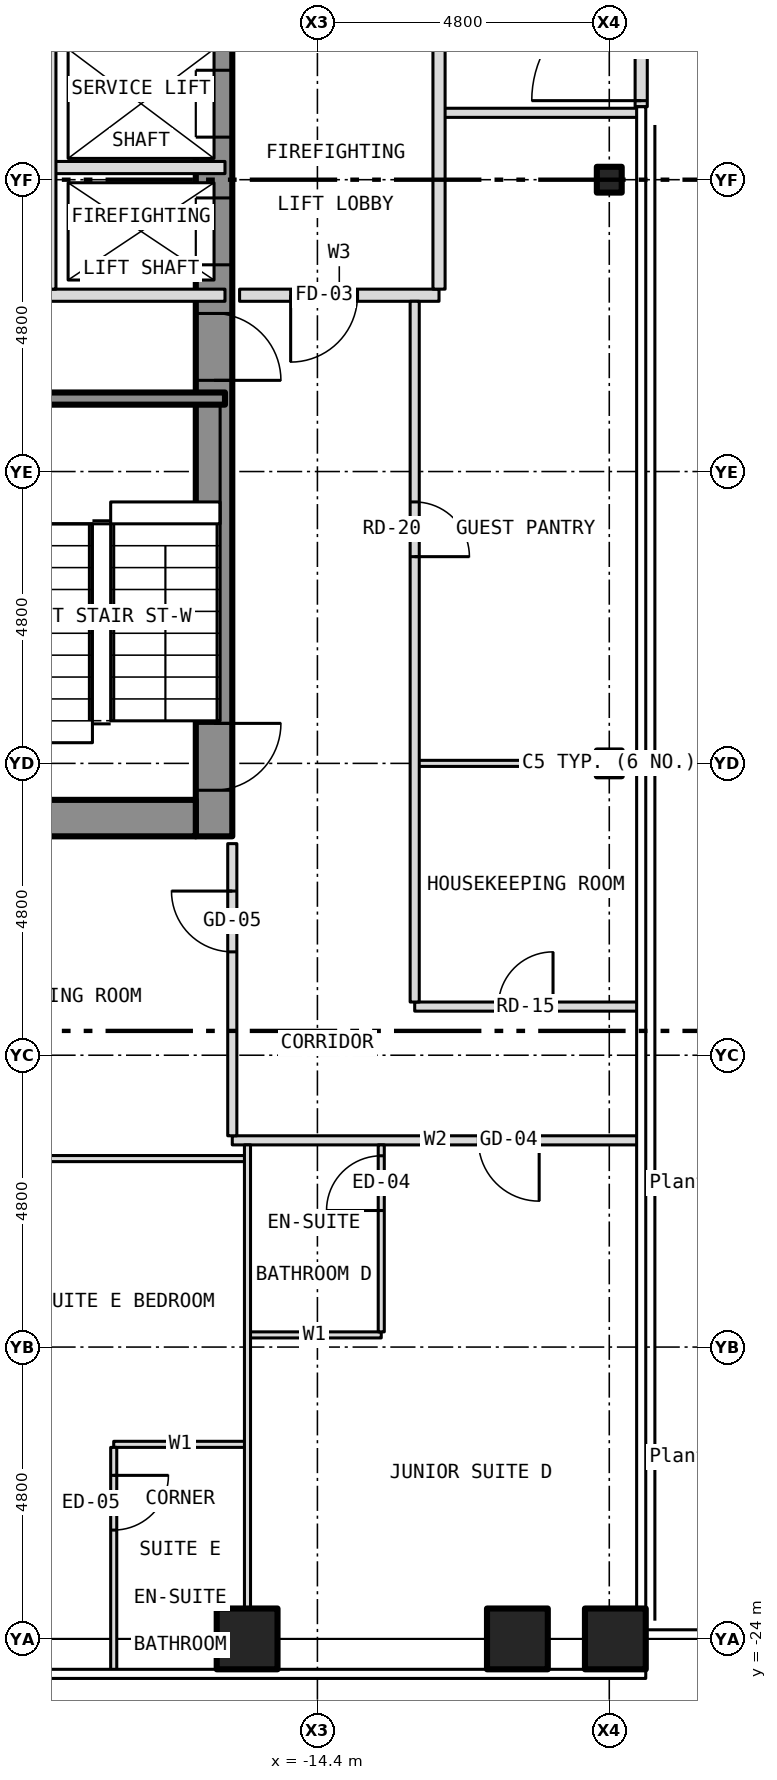
"""IFC4 building model, lengths in metres.
Left out: names, types, materials, properties, quantities, classifications, styles, units other than length and angle.
Written with IfcOpenShell. Run it as: python <this file> out.ifc"""

import sys

from ifc_helpers import new_model, si_unit, direction, frame, frame_2d, origin, origin_2d, place, context, subcontext, project, spatial, rectangle, hollow_rectangle, i_section, extrude, element, fill, save


model = new_model("IFC4")
c1 = context("Model", 3, precision=1e-05, world=origin(), true_north=direction((0.0, 1.0)))
c2 = subcontext(c1, "Body", "Model", "MODEL_VIEW")
j1 = project(units=[si_unit("LENGTHUNIT", "METRE"), si_unit("PLANEANGLEUNIT", "RADIAN")], contexts=[c1])
p1 = place(None, origin())
s1 = spatial("IfcSite", under=j1, at=p1, CompositionType="ELEMENT")
p2 = place(p1, origin())
s2 = spatial("IfcBuilding", under=s1, at=p2, CompositionType="ELEMENT")
p3 = place(p2, frame((0.0, 0.0, 60.0)))
s3 = spatial("IfcBuildingStorey", under=s2, at=p3, CompositionType="ELEMENT", Elevation=60.0)
for number, where, z_axis, x_axis in (
    (1, (-15.556, -24.0, -0.15), (0.0, 0.0, 1.0), (1.0, 0.0, 0.0)),
    (2, (-11.111, -24.0, -0.15), (0.0, 0.0, 1.0), (1.0, 0.0, 0.0)),
    (3, (-9.5, -24.0, -0.15), (0.0, 0.0, 1.0), (1.0, 0.0, 0.0)),
):
    element("IfcColumn", number, at=place(p3, frame(where, z_axis=z_axis, x_axis=x_axis)), inside=s3, PredefinedType="COLUMN", context=c2, shape_type="SweptSolid", body=[
        extrude(hollow_rectangle(XDim=1.0, YDim=1.0, WallThickness=0.06, at=origin_2d()), origin(), (0.0, 0.0, 1.0), 3.5),
    ])
for number, where, z_axis, x_axis in (
    (4, (-9.6, -9.6, -0.15), (0.0, 0.0, 1.0), (1.0, 0.0, 0.0)),
    (5, (-9.6, 0.0, -0.15), (0.0, 0.0, 1.0), (1.0, 0.0, 0.0)),
):
    element("IfcColumn", number, at=place(p3, frame(where, z_axis=z_axis, x_axis=x_axis)), inside=s3, PredefinedType="COLUMN", context=c2, shape_type="SweptSolid", body=[
        extrude(i_section(OverallWidth=0.409, OverallDepth=0.424, WebThickness=0.033, FlangeThickness=0.052, at=origin_2d()), origin(), (0.0, 0.0, 1.0), 3.5),
    ])
p4 = place(p3, frame((-16.1, -10.8, 0.0), z_axis=(0.0, 0.0, 1.0), x_axis=(0.0, 1.0, 0.0)))
e6 = element("IfcWall", 6, at=p4, inside=s3, PredefinedType="SHEAR", context=c2, shape_type="SweptSolid", body=[
    extrude(rectangle(XDim=21.6, YDim=0.6, at=frame_2d((10.8, 0.0))), origin(), (0.0, 0.0, 1.0), 3.25),
])
p5 = place(p4, frame((9.4, 0.0, 0.0)))
e7 = element("IfcOpeningElement", 7, at=p5, cuts=e6, PredefinedType="OPENING", context=c2, shape_type="SweptSolid", body=[
    extrude(rectangle(XDim=1.1, YDim=2.1, at=frame_2d((0.55, 1.05))), frame((0.0, 0.312, 0.0), z_axis=(0.0, -1.0, 0.0), x_axis=(1.0, 0.0, 0.0)), (0.0, 0.0, 1.0), 0.624),
])
p6 = place(p4, frame((11.5, 0.0, 0.0)))
e8 = element("IfcOpeningElement", 8, at=p6, cuts=e6, PredefinedType="OPENING", context=c2, shape_type="SweptSolid", body=[
    extrude(rectangle(XDim=1.1, YDim=2.1, at=frame_2d((0.55, 1.05))), frame((0.0, 0.312, 0.0), z_axis=(0.0, -1.0, 0.0), x_axis=(1.0, 0.0, 0.0)), (0.0, 0.0, 1.0), 0.624),
])
p7 = place(p4, frame((13.6, 0.0, 0.0)))
e9 = element("IfcOpeningElement", 9, at=p7, cuts=e6, PredefinedType="OPENING", context=c2, shape_type="SweptSolid", body=[
    extrude(rectangle(XDim=1.1, YDim=2.1, at=frame_2d((0.55, 1.05))), frame((0.0, 0.312, 0.0), z_axis=(0.0, -1.0, 0.0), x_axis=(1.0, 0.0, 0.0)), (0.0, 0.0, 1.0), 0.624),
])
p8 = place(p4, frame((15.7, 0.0, 0.0)))
e10 = element("IfcOpeningElement", 10, at=p8, cuts=e6, PredefinedType="OPENING", context=c2, shape_type="SweptSolid", body=[
    extrude(rectangle(XDim=1.1, YDim=2.1, at=frame_2d((0.55, 1.05))), frame((0.0, 0.312, 0.0), z_axis=(0.0, -1.0, 0.0), x_axis=(1.0, 0.0, 0.0)), (0.0, 0.0, 1.0), 0.624),
])
p9 = place(p4, frame((17.8, 0.0, 0.0)))
e11 = element("IfcOpeningElement", 11, at=p9, cuts=e6, PredefinedType="OPENING", context=c2, shape_type="SweptSolid", body=[
    extrude(rectangle(XDim=1.1, YDim=2.1, at=frame_2d((0.55, 1.05))), frame((0.0, 0.312, 0.0), z_axis=(0.0, -1.0, 0.0), x_axis=(1.0, 0.0, 0.0)), (0.0, 0.0, 1.0), 0.624),
])
p10 = place(p4, frame((0.758, 0.0, 0.0)))
e12 = element("IfcOpeningElement", 12, at=p10, cuts=e6, PredefinedType="OPENING", context=c2, shape_type="SweptSolid", body=[
    extrude(rectangle(XDim=1.1, YDim=2.1, at=frame_2d((0.55, 1.05))), frame((0.0, 0.312, 0.0), z_axis=(0.0, -1.0, 0.0), x_axis=(1.0, 0.0, 0.0)), (0.0, 0.0, 1.0), 0.624),
])
p11 = place(p4, frame((7.5, 0.0, 0.0)))
e13 = element("IfcOpeningElement", 13, at=p11, cuts=e6, PredefinedType="OPENING", context=c2, shape_type="SweptSolid", body=[
    extrude(rectangle(XDim=1.1, YDim=2.1, at=frame_2d((0.55, 1.05))), frame((0.0, 0.312, 0.0), z_axis=(0.0, -1.0, 0.0), x_axis=(1.0, 0.0, 0.0)), (0.0, 0.0, 1.0), 0.624),
])
p12 = place(p3, frame((-23.4, -10.5, 0.0), z_axis=(0.0, 0.0, 1.0), x_axis=(1.0, 0.0, 0.0)))
e14 = element("IfcWall", 14, at=p12, inside=s3, PredefinedType="SHEAR", context=c2, shape_type="SweptSolid", body=[
    extrude(rectangle(XDim=7.0, YDim=0.6, at=frame_2d((3.5, 0.0))), origin(), (0.0, 0.0, 1.0), 3.25),
])
p13 = place(p3, frame((-9.075, 1.2, 0.0), z_axis=(0.0, 0.0, 1.0), x_axis=(0.0, 1.0, 0.0)))
e15 = element("IfcWall", 15, at=p13, inside=s3, PredefinedType="SOLIDWALL", context=c2, shape_type="SweptSolid", body=[
    extrude(rectangle(XDim=2.0, YDim=0.2, at=frame_2d((1.0, 0.0))), origin(), (0.0, 0.0, 1.0), 2.593),
])
p14 = place(p13, frame((0.1, 0.0, 0.0)))
e16 = element("IfcOpeningElement", 16, at=p14, cuts=e15, PredefinedType="OPENING", context=c2, shape_type="SweptSolid", body=[
    extrude(rectangle(XDim=1.8, YDim=2.1, at=frame_2d((0.9, 1.05))), frame((0.0, 0.112, 0.0), z_axis=(0.0, -1.0, 0.0), x_axis=(1.0, 0.0, 0.0)), (0.0, 0.0, 1.0), 0.224),
])
for number, where, z_axis, x_axis in (
    (17, (-17.75, -20.8, 0.0), (0.0, 0.0, 1.0), (1.0, 0.0, 0.0)),
    (18, (-15.55, -19.0, 0.0), (0.0, 0.0, 1.0), (1.0, 0.0, 0.0)),
):
    element("IfcWall", number, at=place(p3, frame(where, z_axis=z_axis, x_axis=x_axis)), inside=s3, PredefinedType="PARTITIONING", context=c2, shape_type="SweptSolid", body=[
        extrude(rectangle(XDim=2.2, YDim=0.1, at=frame_2d((1.1, 0.0))), origin(), (0.0, 0.0, 1.0), 3.35),
    ])
p15 = place(p3, frame((-23.88, -16.1, 0.0), z_axis=(0.0, 0.0, 1.0), x_axis=(1.0, 0.0, 0.0)))
e19 = element("IfcWall", 19, at=p15, inside=s3, PredefinedType="PARTITIONING", context=c2, shape_type="SweptSolid", body=[
    extrude(rectangle(XDim=8.33, YDim=0.1, at=frame_2d((4.165, 0.0))), origin(), (0.0, 0.0, 1.0), 3.35),
])
p16 = place(p15, frame((3.652, 0.0, 0.0)))
e20 = element("IfcOpeningElement", 20, at=p16, cuts=e19, PredefinedType="OPENING", context=c2, shape_type="SweptSolid", body=[
    extrude(rectangle(XDim=0.9, YDim=2.1, at=frame_2d((0.45, 1.05))), frame((0.0, 0.062, 0.0), z_axis=(0.0, -1.0, 0.0), x_axis=(1.0, 0.0, 0.0)), (0.0, 0.0, 1.0), 0.124),
])
p17 = place(p3, frame((-15.8, -15.8, 0.0), z_axis=(0.0, 0.0, 1.0), x_axis=(1.0, 0.0, 0.0)))
e21 = element("IfcWall", 21, at=p17, inside=s3, PredefinedType="PARTITIONING", context=c2, shape_type="SweptSolid", body=[
    extrude(rectangle(XDim=6.68, YDim=0.15, at=frame_2d((3.34, 0.0))), origin(), (0.0, 0.0, 1.0), 3.35),
])
p18 = place(p17, frame((4.047, 0.0, 0.0)))
e22 = element("IfcOpeningElement", 22, at=p18, cuts=e21, PredefinedType="OPENING", context=c2, shape_type="SweptSolid", body=[
    extrude(rectangle(XDim=1.0, YDim=2.1, at=frame_2d((0.5, 1.05))), frame((0.0, 0.087, 0.0), z_axis=(0.0, -1.0, 0.0), x_axis=(1.0, 0.0, 0.0)), (0.0, 0.0, 1.0), 0.174),
])
p19 = place(p3, frame((-12.8, -13.6, 0.0), z_axis=(0.0, 0.0, 1.0), x_axis=(1.0, 0.0, 0.0)))
e23 = element("IfcWall", 23, at=p19, inside=s3, PredefinedType="PARTITIONING", context=c2, shape_type="SweptSolid", body=[
    extrude(rectangle(XDim=3.68, YDim=0.15, at=frame_2d((1.84, 0.0))), origin(), (0.0, 0.0, 1.0), 3.35),
])
p20 = place(p19, frame((1.375, 0.0, 0.0)))
e24 = element("IfcOpeningElement", 24, at=p20, cuts=e23, PredefinedType="OPENING", context=c2, shape_type="SweptSolid", body=[
    extrude(rectangle(XDim=0.9, YDim=2.1, at=frame_2d((0.45, 1.05))), frame((0.0, 0.087, 0.0), z_axis=(0.0, -1.0, 0.0), x_axis=(1.0, 0.0, 0.0)), (0.0, 0.0, 1.0), 0.174),
])
p21 = place(p3, frame((-12.8, -9.6, 0.0), z_axis=(0.0, 0.0, 1.0), x_axis=(1.0, 0.0, 0.0)))
e25 = element("IfcWall", 25, at=p21, inside=s3, PredefinedType="PARTITIONING", context=c2, shape_type="SweptSolid", body=[
    extrude(rectangle(XDim=2.996, YDim=0.1, at=frame_2d((1.498, 0.0))), origin(), (0.0, 0.0, 1.0), 2.728),
])
p22 = place(p3, frame((-9.804, -9.6, 0.0), z_axis=(0.0, 0.0, 1.0), x_axis=(1.0, 0.0, 0.0)))
e26 = element("IfcWall", 26, at=p22, inside=s3, PredefinedType="PARTITIONING", context=c2, shape_type="SweptSolid", body=[
    extrude(rectangle(XDim=0.534, YDim=0.1, at=frame_2d((0.267, 0.0))), origin(), (0.0, 0.0, 1.0), 3.35),
])
p23 = place(p3, frame((-20.0, -3.6, 0.0), z_axis=(0.0, 0.0, 1.0), x_axis=(1.0, 0.0, 0.0)))
e27 = element("IfcWall", 27, at=p23, inside=s3, PredefinedType="SHEAR", context=c2, shape_type="SweptSolid", body=[
    extrude(rectangle(XDim=4.08, YDim=0.2, at=frame_2d((2.04, 0.0))), origin(), (0.0, 0.0, 1.0), 3.25),
])
p24 = place(p3, frame((-23.88, -1.9, 0.0), z_axis=(0.0, 0.0, 1.0), x_axis=(1.0, 0.0, 0.0)))
e28 = element("IfcWall", 28, at=p24, inside=s3, PredefinedType="PARTITIONING", context=c2, shape_type="SweptSolid", body=[
    extrude(rectangle(XDim=7.96, YDim=0.2, at=frame_2d((3.98, 0.0))), origin(), (0.0, 0.0, 1.0), 3.25),
])
p25 = place(p24, frame((3.32, 0.0, 0.0)))
e29 = element("IfcOpeningElement", 29, at=p25, cuts=e28, PredefinedType="OPENING", context=c2, shape_type="SweptSolid", body=[
    extrude(rectangle(XDim=0.9, YDim=2.1, at=frame_2d((0.45, 1.05))), frame((0.0, 0.112, 0.0), z_axis=(0.0, -1.0, 0.0), x_axis=(1.0, 0.0, 0.0)), (0.0, 0.0, 1.0), 0.224),
])
p26 = place(p3, frame((-15.68, -1.9, 0.0), z_axis=(0.0, 0.0, 1.0), x_axis=(1.0, 0.0, 0.0)))
e30 = element("IfcWall", 30, at=p26, inside=s3, PredefinedType="PARTITIONING", context=c2, shape_type="SweptSolid", body=[
    extrude(rectangle(XDim=3.28, YDim=0.2, at=frame_2d((1.64, 0.0))), origin(), (0.0, 0.0, 1.0), 3.35),
])
p27 = place(p26, frame((0.84, 0.0, 0.0)))
e31 = element("IfcOpeningElement", 31, at=p27, cuts=e30, PredefinedType="OPENING", context=c2, shape_type="SweptSolid", body=[
    extrude(rectangle(XDim=1.1, YDim=2.1, at=frame_2d((0.55, 1.05))), frame((0.0, 0.112, 0.0), z_axis=(0.0, -1.0, 0.0), x_axis=(1.0, 0.0, 0.0)), (0.0, 0.0, 1.0), 0.224),
])
p28 = place(p3, frame((-18.8, 0.2, 0.0), z_axis=(0.0, 0.0, 1.0), x_axis=(1.0, 0.0, 0.0)))
e32 = element("IfcWall", 32, at=p28, inside=s3, PredefinedType="PARTITIONING", context=c2, shape_type="SweptSolid", body=[
    extrude(rectangle(XDim=2.88, YDim=0.2, at=frame_2d((1.44, 0.0))), origin(), (0.0, 0.0, 1.0), 3.25),
])
p29 = place(p3, frame((-12.4, 1.1, 0.0), z_axis=(0.0, 0.0, 1.0), x_axis=(1.0, 0.0, 0.0)))
e33 = element("IfcWall", 33, at=p29, inside=s3, PredefinedType="PARTITIONING", context=c2, shape_type="SweptSolid", body=[
    extrude(rectangle(XDim=3.28, YDim=0.15, at=frame_2d((1.64, 0.0))), origin(), (0.0, 0.0, 1.0), 3.35),
])
p30 = place(p3, frame((-18.8, -1.8, 0.0), z_axis=(0.0, 0.0, 1.0), x_axis=(0.0, 1.0, 0.0)))
e34 = element("IfcWall", 34, at=p30, inside=s3, PredefinedType="PARTITIONING", context=c2, shape_type="SweptSolid", body=[
    extrude(rectangle(XDim=4.0, YDim=0.2, at=frame_2d((2.0, 0.0))), origin(), (0.0, 0.0, 1.0), 3.25),
])
p31 = place(p3, frame((-17.75, -24.53, 0.0), z_axis=(0.0, 0.0, 1.0), x_axis=(0.0, 1.0, 0.0)))
e35 = element("IfcWall", 35, at=p31, inside=s3, PredefinedType="PARTITIONING", context=c2, shape_type="SweptSolid", body=[
    extrude(rectangle(XDim=3.68, YDim=0.1, at=frame_2d((1.84, 0.0))), origin(), (0.0, 0.0, 1.0), 3.35),
])
p32 = place(p31, frame((2.32, 0.0, 0.0)))
e36 = element("IfcOpeningElement", 36, at=p32, cuts=e35, PredefinedType="OPENING", context=c2, shape_type="SweptSolid", body=[
    extrude(rectangle(XDim=0.9, YDim=2.1, at=frame_2d((0.45, 1.05))), frame((0.0, 0.062, 0.0), z_axis=(0.0, -1.0, 0.0), x_axis=(1.0, 0.0, 0.0)), (0.0, 0.0, 1.0), 0.124),
])
p33 = place(p3, frame((-15.8, -15.725, 0.0), z_axis=(0.0, 0.0, 1.0), x_axis=(0.0, 1.0, 0.0)))
e37 = element("IfcWall", 37, at=p33, inside=s3, PredefinedType="PARTITIONING", context=c2, shape_type="SweptSolid", body=[
    extrude(rectangle(XDim=4.805, YDim=0.15, at=frame_2d((2.403, 0.0))), origin(), (0.0, 0.0, 1.0), 3.35),
])
p34 = place(p33, frame((3.025, 0.0, 0.0)))
e38 = element("IfcOpeningElement", 38, at=p34, cuts=e37, PredefinedType="OPENING", context=c2, shape_type="SweptSolid", body=[
    extrude(rectangle(XDim=1.0, YDim=2.1, at=frame_2d((0.5, 1.05))), frame((0.0, 0.087, 0.0), z_axis=(0.0, -1.0, 0.0), x_axis=(1.0, 0.0, 0.0)), (0.0, 0.0, 1.0), 0.174),
])
p35 = place(p3, frame((-15.55, -23.88, 0.0), z_axis=(0.0, 0.0, 1.0), x_axis=(0.0, 1.0, 0.0)))
e39 = element("IfcWall", 39, at=p35, inside=s3, PredefinedType="PARTITIONING", context=c2, shape_type="SweptSolid", body=[
    extrude(rectangle(XDim=8.005, YDim=0.1, at=frame_2d((4.002, 0.0))), origin(), (0.0, 0.0, 1.0), 3.35),
])
p36 = place(p3, frame((-13.35, -18.95, 0.0), z_axis=(0.0, 0.0, 1.0), x_axis=(0.0, 1.0, 0.0)))
e40 = element("IfcWall", 40, at=p36, inside=s3, PredefinedType="PARTITIONING", context=c2, shape_type="SweptSolid", body=[
    extrude(rectangle(XDim=3.075, YDim=0.1, at=frame_2d((1.538, 0.0))), origin(), (0.0, 0.0, 1.0), 3.35),
])
p37 = place(p36, frame((1.996, 0.0, 0.0)))
e41 = element("IfcOpeningElement", 41, at=p37, cuts=e40, PredefinedType="OPENING", context=c2, shape_type="SweptSolid", body=[
    extrude(rectangle(XDim=0.9, YDim=2.1, at=frame_2d((0.45, 1.05))), frame((0.0, 0.062, 0.0), z_axis=(0.0, -1.0, 0.0), x_axis=(1.0, 0.0, 0.0)), (0.0, 0.0, 1.0), 0.124),
])
p38 = place(p3, frame((-12.8, -13.525, 0.0), z_axis=(0.0, 0.0, 1.0), x_axis=(0.0, 1.0, 0.0)))
e42 = element("IfcWall", 42, at=p38, inside=s3, PredefinedType="PARTITIONING", context=c2, shape_type="SweptSolid", body=[
    extrude(rectangle(XDim=11.525, YDim=0.15, at=frame_2d((5.762, 0.0))), origin(), (0.0, 0.0, 1.0), 3.35),
])
p39 = place(p38, frame((7.325, 0.0, 0.0)))
e43 = element("IfcOpeningElement", 43, at=p39, cuts=e42, PredefinedType="OPENING", context=c2, shape_type="SweptSolid", body=[
    extrude(rectangle(XDim=0.9, YDim=2.1, at=frame_2d((0.45, 1.05))), frame((0.0, 0.087, 0.0), z_axis=(0.0, -1.0, 0.0), x_axis=(1.0, 0.0, 0.0)), (0.0, 0.0, 1.0), 0.174),
])
p40 = place(p3, frame((-12.4, -1.8, 0.0), z_axis=(0.0, 0.0, 1.0), x_axis=(0.0, 1.0, 0.0)))
e44 = element("IfcWall", 44, at=p40, inside=s3, PredefinedType="PARTITIONING", context=c2, shape_type="SweptSolid", body=[
    extrude(rectangle(XDim=4.0, YDim=0.2, at=frame_2d((2.0, 0.0))), origin(), (0.0, 0.0, 1.0), 3.35),
])
p41 = place(p14, origin())
e45 = element("IfcDoor", 45, at=p41, inside=s3, OperationType="DOUBLE_DOOR_DOUBLE_SWING", PredefinedType="DOOR", context=c2, shape_type="SweptSolid", body=[
    extrude(rectangle(XDim=1.8, YDim=2.1, at=frame_2d((0.9, 1.05))), frame((0.0, 0.025, 0.0), z_axis=(0.0, -1.0, 0.0), x_axis=(1.0, 0.0, 0.0)), (0.0, 0.0, 1.0), 0.05),
])
fill(e16, e45)
p42 = place(p5, origin())
e46 = element("IfcDoor", 46, at=p42, inside=s3, OperationType="SLIDING_TO_LEFT", PredefinedType="DOOR", context=c2, shape_type="SweptSolid", body=[
    extrude(rectangle(XDim=1.1, YDim=2.1, at=frame_2d((0.55, 1.05))), frame((0.0, 0.025, 0.0), z_axis=(0.0, -1.0, 0.0), x_axis=(1.0, 0.0, 0.0)), (0.0, 0.0, 1.0), 0.05),
])
fill(e7, e46)
p43 = place(p6, origin())
e47 = element("IfcDoor", 47, at=p43, inside=s3, OperationType="SLIDING_TO_LEFT", PredefinedType="DOOR", context=c2, shape_type="SweptSolid", body=[
    extrude(rectangle(XDim=1.1, YDim=2.1, at=frame_2d((0.55, 1.05))), frame((0.0, 0.025, 0.0), z_axis=(0.0, -1.0, 0.0), x_axis=(1.0, 0.0, 0.0)), (0.0, 0.0, 1.0), 0.05),
])
fill(e8, e47)
p44 = place(p10, origin())
e48 = element("IfcDoor", 48, at=p44, inside=s3, OperationType="SINGLE_SWING_RIGHT", PredefinedType="DOOR", context=c2, shape_type="SweptSolid", body=[
    extrude(rectangle(XDim=1.1, YDim=2.1, at=frame_2d((0.55, 1.05))), frame((0.0, 0.025, 0.0), z_axis=(0.0, -1.0, 0.0), x_axis=(1.0, 0.0, 0.0)), (0.0, 0.0, 1.0), 0.05),
])
fill(e12, e48)
p45 = place(p11, origin())
e49 = element("IfcDoor", 49, at=p45, inside=s3, OperationType="SINGLE_SWING_LEFT", PredefinedType="DOOR", context=c2, shape_type="SweptSolid", body=[
    extrude(rectangle(XDim=1.1, YDim=2.1, at=frame_2d((0.55, 1.05))), frame((0.0, 0.025, 0.0), z_axis=(0.0, -1.0, 0.0), x_axis=(1.0, 0.0, 0.0)), (0.0, 0.0, 1.0), 0.05),
])
fill(e13, e49)
p46 = place(p27, origin())
e50 = element("IfcDoor", 50, at=p46, inside=s3, OperationType="SINGLE_SWING_LEFT", PredefinedType="DOOR", context=c2, shape_type="SweptSolid", body=[
    extrude(rectangle(XDim=1.1, YDim=2.1, at=frame_2d((0.55, 1.05))), frame((0.0, 0.025, 0.0), z_axis=(0.0, -1.0, 0.0), x_axis=(1.0, 0.0, 0.0)), (0.0, 0.0, 1.0), 0.05),
])
fill(e31, e50)
p47 = place(p18, origin())
e51 = element("IfcDoor", 51, at=p47, inside=s3, OperationType="SINGLE_SWING_RIGHT", PredefinedType="DOOR", context=c2, shape_type="SweptSolid", body=[
    extrude(rectangle(XDim=1.0, YDim=2.1, at=frame_2d((0.5, 1.05))), frame((0.0, 0.025, 0.0), z_axis=(0.0, -1.0, 0.0), x_axis=(1.0, 0.0, 0.0)), (0.0, 0.0, 1.0), 0.05),
])
fill(e22, e51)
p48 = place(p37, origin())
e52 = element("IfcDoor", 52, at=p48, inside=s3, OperationType="SINGLE_SWING_LEFT", PredefinedType="DOOR", context=c2, shape_type="SweptSolid", body=[
    extrude(rectangle(XDim=0.9, YDim=2.1, at=frame_2d((0.45, 1.05))), frame((0.0, 0.025, 0.0), z_axis=(0.0, -1.0, 0.0), x_axis=(1.0, 0.0, 0.0)), (0.0, 0.0, 1.0), 0.05),
])
fill(e41, e52)
p49 = place(p34, origin())
e53 = element("IfcDoor", 53, at=p49, inside=s3, OperationType="SINGLE_SWING_RIGHT", PredefinedType="DOOR", context=c2, shape_type="SweptSolid", body=[
    extrude(rectangle(XDim=1.0, YDim=2.1, at=frame_2d((0.5, 1.05))), frame((0.0, 0.025, 0.0), z_axis=(0.0, -1.0, 0.0), x_axis=(1.0, 0.0, 0.0)), (0.0, 0.0, 1.0), 0.05),
])
fill(e38, e53)
p50 = place(p32, origin())
e54 = element("IfcDoor", 54, at=p50, inside=s3, OperationType="SINGLE_SWING_RIGHT", PredefinedType="DOOR", context=c2, shape_type="SweptSolid", body=[
    extrude(rectangle(XDim=0.9, YDim=2.1, at=frame_2d((0.45, 1.05))), frame((0.0, 0.025, 0.0), z_axis=(0.0, -1.0, 0.0), x_axis=(1.0, 0.0, 0.0)), (0.0, 0.0, 1.0), 0.05),
])
fill(e36, e54)
p51 = place(p20, origin())
e55 = element("IfcDoor", 55, at=p51, inside=s3, OperationType="SINGLE_SWING_RIGHT", PredefinedType="DOOR", context=c2, shape_type="SweptSolid", body=[
    extrude(rectangle(XDim=0.9, YDim=2.1, at=frame_2d((0.45, 1.05))), frame((0.0, 0.025, 0.0), z_axis=(0.0, -1.0, 0.0), x_axis=(1.0, 0.0, 0.0)), (0.0, 0.0, 1.0), 0.05),
])
fill(e24, e55)
p52 = place(p39, origin())
e56 = element("IfcDoor", 56, at=p52, inside=s3, OperationType="SINGLE_SWING_LEFT", PredefinedType="DOOR", context=c2, shape_type="SweptSolid", body=[
    extrude(rectangle(XDim=0.9, YDim=2.1, at=frame_2d((0.45, 1.05))), frame((0.0, 0.025, 0.0), z_axis=(0.0, -1.0, 0.0), x_axis=(1.0, 0.0, 0.0)), (0.0, 0.0, 1.0), 0.05),
])
fill(e43, e56)
save(model, sys.argv[1])
